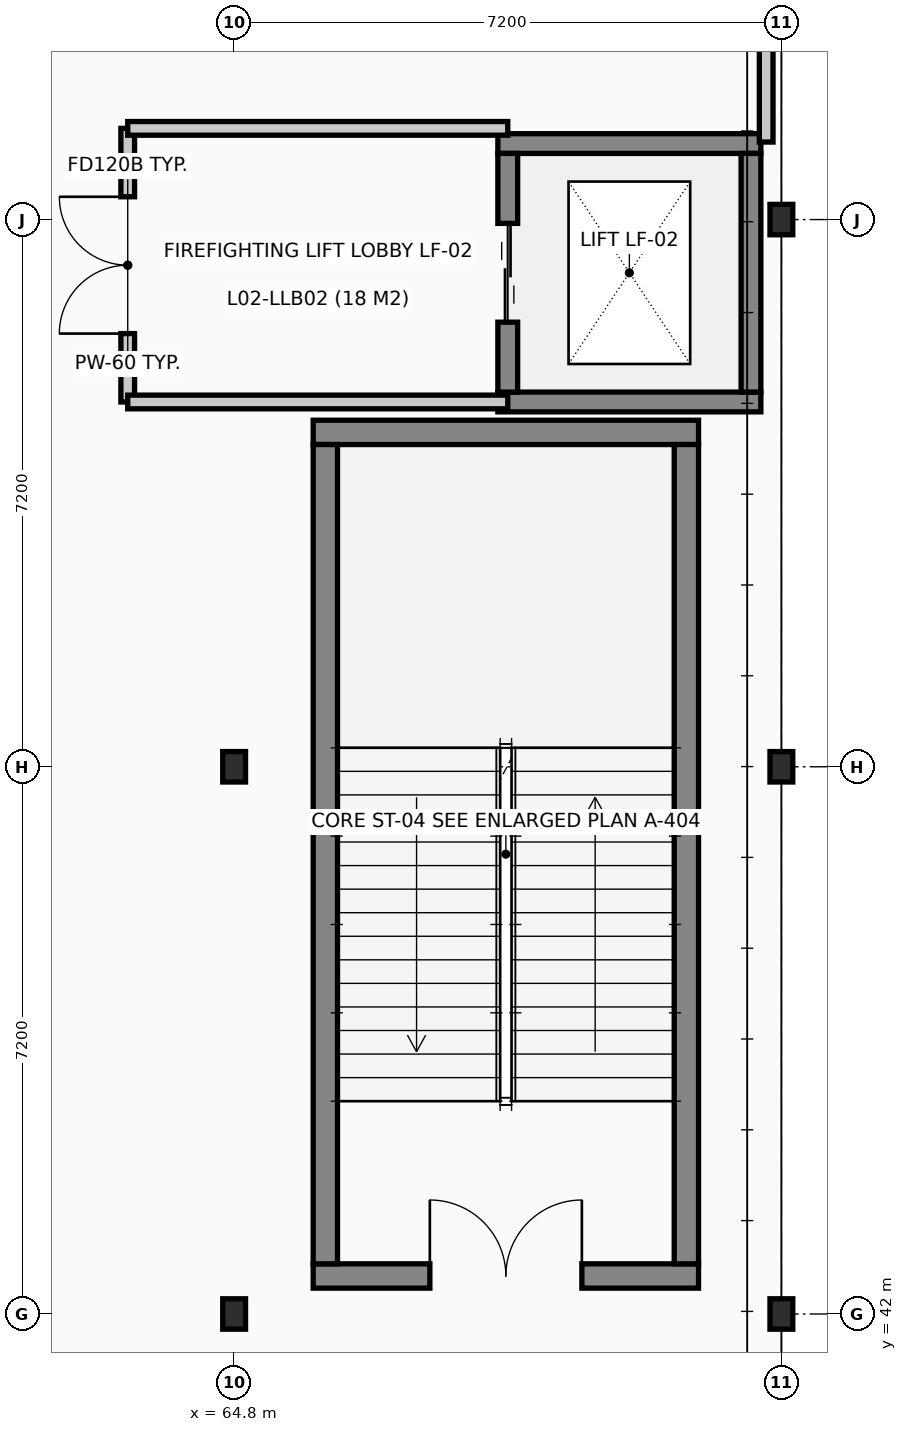
"""IFC4 building model, lengths in metres.
Left out: names, types, materials, properties, quantities, classifications, styles, units other than length and angle.
Written with IfcOpenShell. Run it as: python <this file> out.ifc"""

import sys

from ifc_helpers import new_model, si_unit, direction, frame, frame_2d, origin, origin_2d, place, context, subcontext, project, spatial, rectangle, i_section, extrude, element, fill, save


model = new_model("IFC4")
c1 = context("Model", 3, precision=1e-05, world=origin(), true_north=direction((0.0, 1.0)))
c2 = subcontext(c1, "Body", "Model", "MODEL_VIEW")
j1 = project(units=[si_unit("LENGTHUNIT", "METRE"), si_unit("PLANEANGLEUNIT", "RADIAN")], contexts=[c1])
p1 = place(None, origin())
s1 = spatial("IfcSite", under=j1, at=p1, CompositionType="ELEMENT")
p2 = place(p1, origin())
s2 = spatial("IfcBuilding", under=s1, at=p2, CompositionType="ELEMENT")
p3 = place(p2, frame((0.0, 0.0, 9.6)))
s3 = spatial("IfcBuildingStorey", under=s2, at=p3, CompositionType="ELEMENT", Elevation=9.6)
for number, where, z_axis, x_axis in (
    (1, (64.8, 42.0, 0.0), (0.0, 0.0, 1.0), (1.0, 0.0, 0.0)),
    (2, (64.8, 49.2, 0.0), (0.0, 0.0, 1.0), (1.0, 0.0, 0.0)),
    (3, (72.0, 42.0, 0.0), (0.0, 0.0, 1.0), (1.0, 0.0, 0.0)),
    (4, (72.0, 49.2, 0.0), (0.0, 0.0, 1.0), (1.0, 0.0, 0.0)),
    (5, (72.0, 56.4, 0.0), (0.0, 0.0, 1.0), (1.0, 0.0, 0.0)),
):
    element("IfcColumn", number, at=place(p3, frame(where, z_axis=z_axis, x_axis=x_axis)), inside=s3, PredefinedType="COLUMN", context=c2, shape_type="SweptSolid", body=[
        extrude(i_section(OverallWidth=0.3, OverallDepth=0.4, WebThickness=0.013, FlangeThickness=0.024, at=origin_2d()), origin(), (0.0, 0.0, 1.0), 4.8),
    ])
p4 = place(p3, frame((65.84, 42.5, 0.0), z_axis=(0.0, 0.0, 1.0), x_axis=(1.0, 0.0, 0.0)))
e6 = element("IfcWall", 6, at=p4, inside=s3, PredefinedType="SHEAR", context=c2, shape_type="SweptSolid", body=[
    extrude(rectangle(XDim=5.07, YDim=0.32, at=frame_2d((2.535, 0.0))), origin(), (0.0, 0.0, 1.0), 4.56),
])
p5 = place(p4, frame((1.535, 0.0, 0.0)))
e7 = element("IfcOpeningElement", 7, at=p5, cuts=e6, PredefinedType="OPENING", context=c2, shape_type="SweptSolid", body=[
    extrude(rectangle(XDim=2.0, YDim=2.15, at=frame_2d((1.0, 1.075))), frame((0.0, 0.17, 0.0), z_axis=(0.0, -1.0, 0.0), x_axis=(1.0, 0.0, 0.0)), (0.0, 0.0, 1.0), 0.34),
])
p6 = place(p3, frame((65.84, 53.6, 0.0), z_axis=(0.0, 0.0, 1.0), x_axis=(1.0, 0.0, 0.0)))
e8 = element("IfcWall", 8, at=p6, inside=s3, PredefinedType="SHEAR", context=c2, shape_type="SweptSolid", body=[
    extrude(rectangle(XDim=5.07, YDim=0.32, at=frame_2d((2.535, 0.0))), origin(), (0.0, 0.0, 1.0), 4.56),
])
for number, where, z_axis, x_axis in (
    (9, (66.0, 42.66, 0.0), (0.0, 0.0, 1.0), (0.0, 1.0, 0.0)),
    (10, (70.75, 42.66, 0.0), (0.0, 0.0, 1.0), (0.0, 1.0, 0.0)),
):
    element("IfcWall", number, at=place(p3, frame(where, z_axis=z_axis, x_axis=x_axis)), inside=s3, PredefinedType="SHEAR", context=c2, shape_type="SweptSolid", body=[
        extrude(rectangle(XDim=10.78, YDim=0.32, at=frame_2d((5.39, 0.0))), origin(), (0.0, 0.0, 1.0), 4.56),
    ])
for number, where, z_axis, x_axis in (
    (11, (68.27, 54.0, 0.0), (0.0, 0.0, 1.0), (1.0, 0.0, 0.0)),
    (12, (68.27, 57.4, 0.0), (0.0, 0.0, 1.0), (1.0, 0.0, 0.0)),
):
    element("IfcWall", number, at=place(p3, frame(where, z_axis=z_axis, x_axis=x_axis)), inside=s3, PredefinedType="SHEAR", context=c2, shape_type="SweptSolid", body=[
        extrude(rectangle(XDim=3.46, YDim=0.26, at=frame_2d((1.73, 0.0))), origin(), (0.0, 0.0, 1.0), 4.56),
    ])
p7 = place(p3, frame((68.4, 54.13, 0.0), z_axis=(0.0, 0.0, 1.0), x_axis=(0.0, 1.0, 0.0)))
e13 = element("IfcWall", 13, at=p7, inside=s3, PredefinedType="SHEAR", context=c2, shape_type="SweptSolid", body=[
    extrude(rectangle(XDim=3.14, YDim=0.26, at=frame_2d((1.57, 0.0))), origin(), (0.0, 0.0, 1.0), 4.56),
])
p8 = place(p7, frame((0.92, 0.0, 0.0)))
e14 = element("IfcOpeningElement", 14, at=p8, cuts=e13, PredefinedType="OPENING", context=c2, shape_type="SweptSolid", body=[
    extrude(rectangle(XDim=1.3, YDim=2.2, at=frame_2d((0.65, 1.1))), frame((0.0, 0.14, 0.0), z_axis=(0.0, -1.0, 0.0), x_axis=(1.0, 0.0, 0.0)), (0.0, 0.0, 1.0), 0.28),
])
p9 = place(p3, frame((71.6, 54.13, 0.0), z_axis=(0.0, 0.0, 1.0), x_axis=(0.0, 1.0, 0.0)))
e15 = element("IfcWall", 15, at=p9, inside=s3, PredefinedType="SHEAR", context=c2, shape_type="SweptSolid", body=[
    extrude(rectangle(XDim=3.14, YDim=0.26, at=frame_2d((1.57, 0.0))), origin(), (0.0, 0.0, 1.0), 4.56),
])
p10 = place(p3, frame((63.4, 54.0, 0.0), z_axis=(0.0, 0.0, 1.0), x_axis=(0.0, 1.0, 0.0)))
e16 = element("IfcWall", 16, at=p10, inside=s3, PredefinedType="PARTITIONING", context=c2, shape_type="SweptSolid", body=[
    extrude(rectangle(XDim=3.6, YDim=0.18, at=frame_2d((1.8, 0.0))), origin(), (0.0, 0.0, 1.0), 4.545),
])
p11 = place(p10, frame((0.9, 0.0, 0.0)))
e17 = element("IfcOpeningElement", 17, at=p11, cuts=e16, PredefinedType="OPENING", context=c2, shape_type="SweptSolid", body=[
    extrude(rectangle(XDim=1.8, YDim=2.15, at=frame_2d((0.9, 1.075))), frame((0.0, 0.1, 0.0), z_axis=(0.0, -1.0, 0.0), x_axis=(1.0, 0.0, 0.0)), (0.0, 0.0, 1.0), 0.2),
])
for number, where, z_axis, x_axis in (
    (18, (63.4, 54.0, 0.0), (0.0, 0.0, 1.0), (1.0, 0.0, 0.0)),
    (19, (63.4, 57.6, 0.0), (0.0, 0.0, 1.0), (1.0, 0.0, 0.0)),
):
    element("IfcWall", number, at=place(p3, frame(where, z_axis=z_axis, x_axis=x_axis)), inside=s3, PredefinedType="PARTITIONING", context=c2, shape_type="SweptSolid", body=[
        extrude(rectangle(XDim=5.0, YDim=0.18, at=frame_2d((2.5, 0.0))), origin(), (0.0, 0.0, 1.0), 4.545),
    ])
p12 = place(p3, frame((71.8, 57.42, 0.0), z_axis=(0.0, 0.0, 1.0), x_axis=(0.0, 1.0, 0.0)))
e20 = element("IfcWall", 20, at=p12, inside=s3, PredefinedType="PARTITIONING", context=c2, shape_type="SweptSolid", body=[
    extrude(rectangle(XDim=19.96, YDim=0.18, at=frame_2d((9.98, 0.0))), origin(), (0.0, 0.0, 1.0), 4.09),
])
p13 = place(p5, origin())
e21 = element("IfcDoor", 21, at=p13, inside=s3, OperationType="DOUBLE_DOOR_SINGLE_SWING", PredefinedType="DOOR", context=c2, shape_type="SweptSolid", body=[
    extrude(rectangle(XDim=2.0, YDim=2.15, at=frame_2d((1.0, 1.075))), frame((0.0, 0.025, 0.0), z_axis=(0.0, -1.0, 0.0), x_axis=(1.0, 0.0, 0.0)), (0.0, 0.0, 1.0), 0.05),
])
fill(e7, e21)
p14 = place(p8, origin())
e22 = element("IfcDoor", 22, at=p14, inside=s3, OperationType="DOUBLE_DOOR_SLIDING", PredefinedType="DOOR", context=c2, shape_type="SweptSolid", body=[
    extrude(rectangle(XDim=1.3, YDim=2.2, at=frame_2d((0.65, 1.1))), frame((0.0, 0.025, 0.0), z_axis=(0.0, -1.0, 0.0), x_axis=(1.0, 0.0, 0.0)), (0.0, 0.0, 1.0), 0.05),
])
fill(e14, e22)
p15 = place(p11, origin())
e23 = element("IfcDoor", 23, at=p15, inside=s3, OperationType="DOUBLE_DOOR_SINGLE_SWING", PredefinedType="DOOR", context=c2, shape_type="SweptSolid", body=[
    extrude(rectangle(XDim=1.8, YDim=2.15, at=frame_2d((0.9, 1.075))), frame((0.0, 0.025, 0.0), z_axis=(0.0, -1.0, 0.0), x_axis=(1.0, 0.0, 0.0)), (0.0, 0.0, 1.0), 0.05),
])
fill(e17, e23)
save(model, sys.argv[1])
